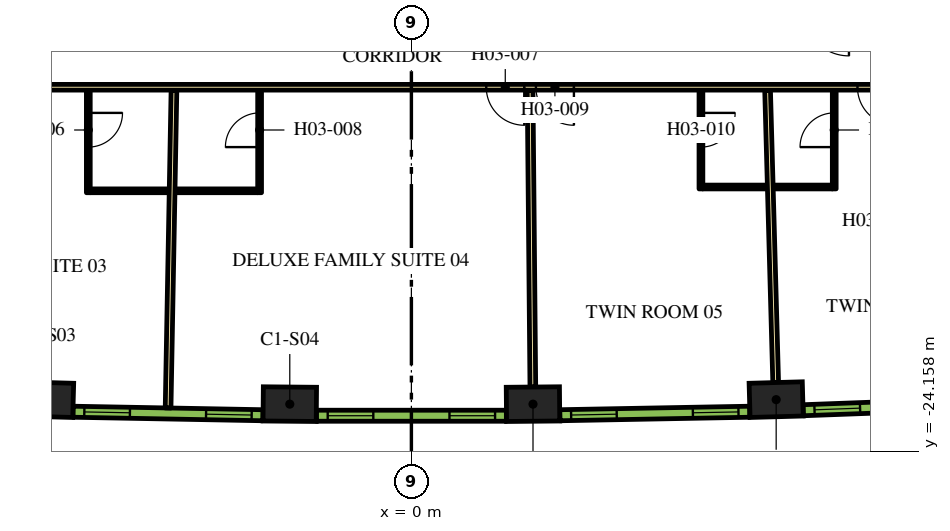
"""IFC4 building model, lengths in metres.
Left out: names, types, materials, properties, quantities, classifications, styles, units other than length and angle.
Written with IfcOpenShell. Run it as: python <this file> out.ifc"""

import sys

from ifc_helpers import new_model, si_unit, direction, frame, frame_2d, origin, origin_2d, place, context, subcontext, project, spatial, rectangle, extrude, element, fill, save


model = new_model("IFC4")
c1 = context("Model", 3, precision=1e-05, world=origin(), true_north=direction((0.0, 1.0)))
c2 = subcontext(c1, "Body", "Model", "MODEL_VIEW")
j1 = project(units=[si_unit("LENGTHUNIT", "METRE"), si_unit("PLANEANGLEUNIT", "RADIAN")], contexts=[c1])
p1 = place(None, origin())
s1 = spatial("IfcSite", under=j1, at=p1, CompositionType="ELEMENT")
p2 = place(p1, origin())
s2 = spatial("IfcBuilding", under=s1, at=p2, CompositionType="ELEMENT")
p3 = place(p2, frame((0.0, 0.0, 51.0)))
s3 = spatial("IfcBuildingStorey", under=s2, at=p3, CompositionType="ELEMENT", Elevation=51.0)
for number, where, z_axis, x_axis in (
    (1, (-9.599, -22.795, 0.0), (0.0, 0.0, 1.0), (1.0, -0.028, 0.0)),
    (2, (-3.2, -22.913, 0.0), (0.0, 0.0, 1.0), (1.0, -0.009, 0.0)),
    (3, (3.2, -22.913, 0.0), (0.0, 0.0, 1.0), (1.0, 0.009, 0.0)),
    (4, (9.599, -22.795, 0.0), (0.0, 0.0, 1.0), (1.0, 0.028, 0.0)),
):
    element("IfcColumn", number, at=place(p3, frame(where, z_axis=z_axis, x_axis=x_axis)), inside=s3, PredefinedType="COLUMN", context=c2, shape_type="SweptSolid", body=[
        extrude(rectangle(XDim=1.4, YDim=0.9, at=origin_2d()), origin(), (0.0, 0.0, 1.0), 3.9),
    ])
p4 = place(p3, frame((12.918, -14.575, 0.0), z_axis=(0.0, 0.0, 1.0), x_axis=(-1.0, 0.0, 0.0)))
e5 = element("IfcWall", 5, at=p4, inside=s3, PredefinedType="PARTITIONING", context=c2, shape_type="SweptSolid", body=[
    extrude(rectangle(XDim=25.766, YDim=0.15, at=frame_2d((12.883, 0.0))), origin(), (0.0, 0.0, 1.0), 2.75),
])
p5 = place(p4, frame((24.586, 0.0, 0.0)))
e6 = element("IfcOpeningElement", 6, at=p5, cuts=e5, PredefinedType="OPENING", context=c2, shape_type="SweptSolid", body=[
    extrude(rectangle(XDim=1.0, YDim=2.1, at=frame_2d((0.5, 1.05))), frame((0.0, 0.085, 0.0), z_axis=(0.0, -1.0, 0.0), x_axis=(1.0, 0.0, 0.0)), (0.0, 0.0, 1.0), 0.17),
])
p6 = place(p4, frame((9.948, 0.0, 0.0)))
e7 = element("IfcOpeningElement", 7, at=p6, cuts=e5, PredefinedType="OPENING", context=c2, shape_type="SweptSolid", body=[
    extrude(rectangle(XDim=1.0, YDim=2.1, at=frame_2d((0.5, 1.05))), frame((0.0, 0.085, 0.0), z_axis=(0.0, -1.0, 0.0), x_axis=(1.0, 0.0, 0.0)), (0.0, 0.0, 1.0), 0.17),
])
p7 = place(p4, frame((8.642, 0.0, 0.0)))
e8 = element("IfcOpeningElement", 8, at=p7, cuts=e5, PredefinedType="OPENING", context=c2, shape_type="SweptSolid", body=[
    extrude(rectangle(XDim=1.0, YDim=2.1, at=frame_2d((0.5, 1.05))), frame((0.0, 0.085, 0.0), z_axis=(0.0, -1.0, 0.0), x_axis=(1.0, 0.0, 0.0)), (0.0, 0.0, 1.0), 0.17),
])
p8 = place(p4, frame((0.18, 0.0, 0.0)))
e9 = element("IfcOpeningElement", 9, at=p8, cuts=e5, PredefinedType="OPENING", context=c2, shape_type="SweptSolid", body=[
    extrude(rectangle(XDim=1.0, YDim=2.1, at=frame_2d((0.5, 1.05))), frame((0.0, 0.085, 0.0), z_axis=(0.0, -1.0, 0.0), x_axis=(1.0, 0.0, 0.0)), (0.0, 0.0, 1.0), 0.17),
])
p9 = place(p3, frame((-6.402, -23.014, 0.0), z_axis=(0.0, 0.0, 1.0), x_axis=(0.01849587109, 0.999828936745, 0.0)))
e10 = element("IfcWall", 10, at=p9, inside=s3, PredefinedType="PARTITIONING", context=c2, shape_type="SweptSolid", body=[
    extrude(rectangle(XDim=8.355, YDim=0.15, at=frame_2d((4.178, 0.0))), origin(), (0.0, 0.0, 1.0), 2.75),
])
p10 = place(p3, frame((3.196, -22.463, 0.0), z_axis=(0.0, 0.0, 1.0), x_axis=(-0.00926060032, 0.999957119721, 0.0)))
e11 = element("IfcWall", 11, at=p10, inside=s3, PredefinedType="PARTITIONING", context=c2, shape_type="SweptSolid", body=[
    extrude(rectangle(XDim=7.803, YDim=0.15, at=frame_2d((3.902, 0.0))), origin(), (0.0, 0.0, 1.0), 2.75),
])
p11 = place(p3, frame((9.586, -22.345, 0.0), z_axis=(0.0, 0.0, 1.0), x_axis=(-0.027722115646, 0.999615668297, 0.0)))
e12 = element("IfcWall", 12, at=p11, inside=s3, PredefinedType="PARTITIONING", context=c2, shape_type="SweptSolid", body=[
    extrude(rectangle(XDim=7.688, YDim=0.15, at=frame_2d((3.844, 0.0))), origin(), (0.0, 0.0, 1.0), 2.75),
])
p12 = place(p3, frame((-8.502, -14.65, 0.0), z_axis=(0.0, 0.0, 1.0), x_axis=(0.0, -1.0, 0.0)))
e13 = element("IfcWall", 13, at=p12, inside=s3, PredefinedType="PARTITIONING", context=c2, shape_type="SweptSolid", body=[
    extrude(rectangle(XDim=2.7, YDim=0.1, at=frame_2d((1.35, 0.0))), origin(), (0.0, 0.0, 1.0), 2.75),
])
p13 = place(p12, frame((0.6, 0.0, 0.0)))
e14 = element("IfcOpeningElement", 14, at=p13, cuts=e13, PredefinedType="OPENING", context=c2, shape_type="SweptSolid", body=[
    extrude(rectangle(XDim=0.9, YDim=2.1, at=frame_2d((0.45, 1.05))), frame((0.0, 0.06, 0.0), z_axis=(0.0, -1.0, 0.0), x_axis=(1.0, 0.0, 0.0)), (0.0, 0.0, 1.0), 0.12),
])
p14 = place(p3, frame((-8.452, -17.3, 0.0), z_axis=(0.0, 0.0, 1.0), x_axis=(1.0, 0.0, 0.0)))
e15 = element("IfcWall", 15, at=p14, inside=s3, PredefinedType="PARTITIONING", context=c2, shape_type="SweptSolid", body=[
    extrude(rectangle(XDim=2.07, YDim=0.1, at=frame_2d((1.035, 0.0))), origin(), (0.0, 0.0, 1.0), 2.75),
])
p15 = place(p3, frame((-3.994, -17.35, 0.0), z_axis=(0.0, 0.0, 1.0), x_axis=(0.0, 1.0, 0.0)))
e16 = element("IfcWall", 16, at=p15, inside=s3, PredefinedType="PARTITIONING", context=c2, shape_type="SweptSolid", body=[
    extrude(rectangle(XDim=2.7, YDim=0.1, at=frame_2d((1.35, 0.0))), origin(), (0.0, 0.0, 1.0), 2.75),
])
p16 = place(p15, frame((1.2, 0.0, 0.0)))
e17 = element("IfcOpeningElement", 17, at=p16, cuts=e16, PredefinedType="OPENING", context=c2, shape_type="SweptSolid", body=[
    extrude(rectangle(XDim=0.9, YDim=2.1, at=frame_2d((0.45, 1.05))), frame((0.0, 0.06, 0.0), z_axis=(0.0, -1.0, 0.0), x_axis=(1.0, 0.0, 0.0)), (0.0, 0.0, 1.0), 0.12),
])
p17 = place(p3, frame((-4.044, -17.3, 0.0), z_axis=(0.0, 0.0, 1.0), x_axis=(-1.0, 0.0, 0.0)))
e18 = element("IfcWall", 18, at=p17, inside=s3, PredefinedType="PARTITIONING", context=c2, shape_type="SweptSolid", body=[
    extrude(rectangle(XDim=2.17, YDim=0.1, at=frame_2d((1.085, 0.0))), origin(), (0.0, 0.0, 1.0), 2.75),
])
p18 = place(p3, frame((7.619, -14.65, 0.0), z_axis=(0.0, 0.0, 1.0), x_axis=(0.0, -1.0, 0.0)))
e19 = element("IfcWall", 19, at=p18, inside=s3, PredefinedType="PARTITIONING", context=c2, shape_type="SweptSolid", body=[
    extrude(rectangle(XDim=2.6, YDim=0.1, at=frame_2d((1.3, 0.0))), origin(), (0.0, 0.0, 1.0), 2.75),
])
p19 = place(p18, frame((0.6, 0.0, 0.0)))
e20 = element("IfcOpeningElement", 20, at=p19, cuts=e19, PredefinedType="OPENING", context=c2, shape_type="SweptSolid", body=[
    extrude(rectangle(XDim=0.9, YDim=2.1, at=frame_2d((0.45, 1.05))), frame((0.0, 0.06, 0.0), z_axis=(0.0, -1.0, 0.0), x_axis=(1.0, 0.0, 0.0)), (0.0, 0.0, 1.0), 0.12),
])
p20 = place(p3, frame((7.669, -17.2, 0.0), z_axis=(0.0, 0.0, 1.0), x_axis=(1.0, 0.0, 0.0)))
e21 = element("IfcWall", 21, at=p20, inside=s3, PredefinedType="PARTITIONING", context=c2, shape_type="SweptSolid", body=[
    extrude(rectangle(XDim=1.69, YDim=0.1, at=frame_2d((0.845, 0.0))), origin(), (0.0, 0.0, 1.0), 2.75),
])
p21 = place(p3, frame((11.127, -17.25, 0.0), z_axis=(0.0, 0.0, 1.0), x_axis=(0.0, 1.0, 0.0)))
e22 = element("IfcWall", 22, at=p21, inside=s3, PredefinedType="PARTITIONING", context=c2, shape_type="SweptSolid", body=[
    extrude(rectangle(XDim=2.6, YDim=0.1, at=frame_2d((1.3, 0.0))), origin(), (0.0, 0.0, 1.0), 2.75),
])
p22 = place(p21, frame((1.1, 0.0, 0.0)))
e23 = element("IfcOpeningElement", 23, at=p22, cuts=e22, PredefinedType="OPENING", context=c2, shape_type="SweptSolid", body=[
    extrude(rectangle(XDim=0.9, YDim=2.1, at=frame_2d((0.45, 1.05))), frame((0.0, 0.06, 0.0), z_axis=(0.0, -1.0, 0.0), x_axis=(1.0, 0.0, 0.0)), (0.0, 0.0, 1.0), 0.12),
])
p23 = place(p3, frame((11.077, -17.2, 0.0), z_axis=(0.0, 0.0, 1.0), x_axis=(-1.0, 0.0, 0.0)))
e24 = element("IfcWall", 24, at=p23, inside=s3, PredefinedType="PARTITIONING", context=c2, shape_type="SweptSolid", body=[
    extrude(rectangle(XDim=1.55, YDim=0.1, at=frame_2d((0.775, 0.0))), origin(), (0.0, 0.0, 1.0), 2.75),
])
p24 = place(p3, frame((-8.904, -23.113, 0.0), z_axis=(0.0, 0.0, 1.0), x_axis=(0.999829529479, -0.018463801951, 0.0)))
e25 = element("IfcWall", 25, at=p24, inside=s3, PredefinedType="SOLIDWALL", context=c2, shape_type="SweptSolid", body=[
    extrude(rectangle(XDim=4.998, YDim=0.29, at=frame_2d((2.499, 0.0))), origin(), (0.0, 0.0, 1.0), 3.65),
])
p25 = place(p24, frame((0.297, 0.0, 0.9)))
e26 = element("IfcOpeningElement", 26, at=p25, cuts=e25, PredefinedType="OPENING", context=c2, shape_type="SweptSolid", body=[
    extrude(rectangle(XDim=1.2, YDim=2.15, at=frame_2d((0.6, 1.075))), frame((0.0, 0.155, 0.0), z_axis=(0.0, -1.0, 0.0), x_axis=(1.0, 0.0, 0.0)), (0.0, 0.0, 1.0), 0.31),
])
p26 = place(p24, frame((3.501, 0.0, 0.9)))
e27 = element("IfcOpeningElement", 27, at=p26, cuts=e25, PredefinedType="OPENING", context=c2, shape_type="SweptSolid", body=[
    extrude(rectangle(XDim=1.2, YDim=2.15, at=frame_2d((0.6, 1.075))), frame((0.0, 0.155, 0.0), z_axis=(0.0, -1.0, 0.0), x_axis=(1.0, 0.0, 0.0)), (0.0, 0.0, 1.0), 0.31),
])
p27 = place(p3, frame((-2.499, -23.218, 0.0), z_axis=(0.0, 0.0, 1.0), x_axis=(1.0, 0.0, 0.0)))
e28 = element("IfcWall", 28, at=p27, inside=s3, PredefinedType="SOLIDWALL", context=c2, shape_type="SweptSolid", body=[
    extrude(rectangle(XDim=4.998, YDim=0.29, at=frame_2d((2.499, 0.0))), origin(), (0.0, 0.0, 1.0), 3.65),
])
p28 = place(p27, frame((0.297, 0.0, 0.9)))
e29 = element("IfcOpeningElement", 29, at=p28, cuts=e28, PredefinedType="OPENING", context=c2, shape_type="SweptSolid", body=[
    extrude(rectangle(XDim=1.2, YDim=2.15, at=frame_2d((0.6, 1.075))), frame((0.0, 0.155, 0.0), z_axis=(0.0, -1.0, 0.0), x_axis=(1.0, 0.0, 0.0)), (0.0, 0.0, 1.0), 0.31),
])
p29 = place(p27, frame((3.501, 0.0, 0.9)))
e30 = element("IfcOpeningElement", 30, at=p29, cuts=e28, PredefinedType="OPENING", context=c2, shape_type="SweptSolid", body=[
    extrude(rectangle(XDim=1.2, YDim=2.15, at=frame_2d((0.6, 1.075))), frame((0.0, 0.155, 0.0), z_axis=(0.0, -1.0, 0.0), x_axis=(1.0, 0.0, 0.0)), (0.0, 0.0, 1.0), 0.31),
])
p30 = place(p3, frame((3.906, -23.205, 0.0), z_axis=(0.0, 0.0, 1.0), x_axis=(0.999829529479, 0.018463801951, 0.0)))
e31 = element("IfcWall", 31, at=p30, inside=s3, PredefinedType="SOLIDWALL", context=c2, shape_type="SweptSolid", body=[
    extrude(rectangle(XDim=4.998, YDim=0.29, at=frame_2d((2.499, 0.0))), origin(), (0.0, 0.0, 1.0), 3.65),
])
p31 = place(p30, frame((0.297, 0.0, 0.9)))
e32 = element("IfcOpeningElement", 32, at=p31, cuts=e31, PredefinedType="OPENING", context=c2, shape_type="SweptSolid", body=[
    extrude(rectangle(XDim=1.2, YDim=2.15, at=frame_2d((0.6, 1.075))), frame((0.0, 0.155, 0.0), z_axis=(0.0, -1.0, 0.0), x_axis=(1.0, 0.0, 0.0)), (0.0, 0.0, 1.0), 0.31),
])
p32 = place(p30, frame((3.501, 0.0, 0.9)))
e33 = element("IfcOpeningElement", 33, at=p32, cuts=e31, PredefinedType="OPENING", context=c2, shape_type="SweptSolid", body=[
    extrude(rectangle(XDim=1.2, YDim=2.15, at=frame_2d((0.6, 1.075))), frame((0.0, 0.155, 0.0), z_axis=(0.0, -1.0, 0.0), x_axis=(1.0, 0.0, 0.0)), (0.0, 0.0, 1.0), 0.31),
])
p33 = place(p3, frame((10.31, -23.074, 0.0), z_axis=(0.0, 0.0, 1.0), x_axis=(0.999317974969, 0.036926750529, 0.0)))
e34 = element("IfcWall", 34, at=p33, inside=s3, PredefinedType="SOLIDWALL", context=c2, shape_type="SweptSolid", body=[
    extrude(rectangle(XDim=4.998, YDim=0.29, at=frame_2d((2.499, 0.0))), origin(), (0.0, 0.0, 1.0), 3.65),
])
p34 = place(p33, frame((0.297, 0.0, 0.9)))
e35 = element("IfcOpeningElement", 35, at=p34, cuts=e34, PredefinedType="OPENING", context=c2, shape_type="SweptSolid", body=[
    extrude(rectangle(XDim=1.2, YDim=2.15, at=frame_2d((0.6, 1.075))), frame((0.0, 0.155, 0.0), z_axis=(0.0, -1.0, 0.0), x_axis=(1.0, 0.0, 0.0)), (0.0, 0.0, 1.0), 0.31),
])
p35 = place(p33, frame((3.501, 0.0, 0.9)))
e36 = element("IfcOpeningElement", 36, at=p35, cuts=e34, PredefinedType="OPENING", context=c2, shape_type="SweptSolid", body=[
    extrude(rectangle(XDim=1.2, YDim=2.15, at=frame_2d((0.6, 1.075))), frame((0.0, 0.155, 0.0), z_axis=(0.0, -1.0, 0.0), x_axis=(1.0, 0.0, 0.0)), (0.0, 0.0, 1.0), 0.31),
])
p36 = place(p13, origin())
e37 = element("IfcDoor", 37, at=p36, inside=s3, OperationType="SINGLE_SWING_RIGHT", PredefinedType="DOOR", context=c2, shape_type="SweptSolid", body=[
    extrude(rectangle(XDim=0.9, YDim=2.1, at=frame_2d((0.45, 1.05))), frame((0.0, 0.025, 0.0), z_axis=(0.0, -1.0, 0.0), x_axis=(1.0, 0.0, 0.0)), (0.0, 0.0, 1.0), 0.05),
])
fill(e14, e37)
p37 = place(p6, origin())
e38 = element("IfcDoor", 38, at=p37, inside=s3, OperationType="SINGLE_SWING_LEFT", PredefinedType="DOOR", context=c2, shape_type="SweptSolid", body=[
    extrude(rectangle(XDim=1.0, YDim=2.1, at=frame_2d((0.5, 1.05))), frame((0.0, 0.025, 0.0), z_axis=(0.0, -1.0, 0.0), x_axis=(1.0, 0.0, 0.0)), (0.0, 0.0, 1.0), 0.05),
])
fill(e7, e38)
p38 = place(p16, origin())
e39 = element("IfcDoor", 39, at=p38, inside=s3, OperationType="SINGLE_SWING_LEFT", PredefinedType="DOOR", context=c2, shape_type="SweptSolid", body=[
    extrude(rectangle(XDim=0.9, YDim=2.1, at=frame_2d((0.45, 1.05))), frame((0.0, 0.025, 0.0), z_axis=(0.0, -1.0, 0.0), x_axis=(1.0, 0.0, 0.0)), (0.0, 0.0, 1.0), 0.05),
])
fill(e17, e39)
p39 = place(p7, origin())
e40 = element("IfcDoor", 40, at=p39, inside=s3, OperationType="SINGLE_SWING_RIGHT", PredefinedType="DOOR", context=c2, shape_type="SweptSolid", body=[
    extrude(rectangle(XDim=1.0, YDim=2.1, at=frame_2d((0.5, 1.05))), frame((0.0, 0.025, 0.0), z_axis=(0.0, -1.0, 0.0), x_axis=(1.0, 0.0, 0.0)), (0.0, 0.0, 1.0), 0.05),
])
fill(e8, e40)
p40 = place(p19, origin())
e41 = element("IfcDoor", 41, at=p40, inside=s3, OperationType="SINGLE_SWING_LEFT", PredefinedType="DOOR", context=c2, shape_type="SweptSolid", body=[
    extrude(rectangle(XDim=0.9, YDim=2.1, at=frame_2d((0.45, 1.05))), frame((0.0, 0.025, 0.0), z_axis=(0.0, -1.0, 0.0), x_axis=(1.0, 0.0, 0.0)), (0.0, 0.0, 1.0), 0.05),
])
fill(e20, e41)
p41 = place(p8, origin())
e42 = element("IfcDoor", 42, at=p41, inside=s3, OperationType="SINGLE_SWING_LEFT", PredefinedType="DOOR", context=c2, shape_type="SweptSolid", body=[
    extrude(rectangle(XDim=1.0, YDim=2.1, at=frame_2d((0.5, 1.05))), frame((0.0, 0.025, 0.0), z_axis=(0.0, -1.0, 0.0), x_axis=(1.0, 0.0, 0.0)), (0.0, 0.0, 1.0), 0.05),
])
fill(e9, e42)
p42 = place(p22, origin())
e43 = element("IfcDoor", 43, at=p42, inside=s3, OperationType="SINGLE_SWING_RIGHT", PredefinedType="DOOR", context=c2, shape_type="SweptSolid", body=[
    extrude(rectangle(XDim=0.9, YDim=2.1, at=frame_2d((0.45, 1.05))), frame((0.0, 0.025, 0.0), z_axis=(0.0, -1.0, 0.0), x_axis=(1.0, 0.0, 0.0)), (0.0, 0.0, 1.0), 0.05),
])
fill(e23, e43)
p43 = place(p25, origin())
e44 = element("IfcWindow", 44, at=p43, inside=s3, PartitioningType="DOUBLE_PANEL_VERTICAL", PredefinedType="WINDOW", context=c2, shape_type="SweptSolid", body=[
    extrude(rectangle(XDim=1.2, YDim=2.15, at=frame_2d((0.6, 1.075))), frame((0.0, 0.015, 0.0), z_axis=(0.0, -1.0, 0.0), x_axis=(1.0, 0.0, 0.0)), (0.0, 0.0, 1.0), 0.06),
])
fill(e26, e44)
p44 = place(p26, origin())
e45 = element("IfcWindow", 45, at=p44, inside=s3, PartitioningType="DOUBLE_PANEL_VERTICAL", PredefinedType="WINDOW", context=c2, shape_type="SweptSolid", body=[
    extrude(rectangle(XDim=1.2, YDim=2.15, at=frame_2d((0.6, 1.075))), frame((0.0, 0.015, 0.0), z_axis=(0.0, -1.0, 0.0), x_axis=(1.0, 0.0, 0.0)), (0.0, 0.0, 1.0), 0.06),
])
fill(e27, e45)
p45 = place(p28, origin())
e46 = element("IfcWindow", 46, at=p45, inside=s3, PartitioningType="DOUBLE_PANEL_VERTICAL", PredefinedType="WINDOW", context=c2, shape_type="SweptSolid", body=[
    extrude(rectangle(XDim=1.2, YDim=2.15, at=frame_2d((0.6, 1.075))), frame((0.0, 0.015, 0.0), z_axis=(0.0, -1.0, 0.0), x_axis=(1.0, 0.0, 0.0)), (0.0, 0.0, 1.0), 0.06),
])
fill(e29, e46)
p46 = place(p29, origin())
e47 = element("IfcWindow", 47, at=p46, inside=s3, PartitioningType="DOUBLE_PANEL_VERTICAL", PredefinedType="WINDOW", context=c2, shape_type="SweptSolid", body=[
    extrude(rectangle(XDim=1.2, YDim=2.15, at=frame_2d((0.6, 1.075))), frame((0.0, 0.015, 0.0), z_axis=(0.0, -1.0, 0.0), x_axis=(1.0, 0.0, 0.0)), (0.0, 0.0, 1.0), 0.06),
])
fill(e30, e47)
p47 = place(p31, origin())
e48 = element("IfcWindow", 48, at=p47, inside=s3, PartitioningType="DOUBLE_PANEL_VERTICAL", PredefinedType="WINDOW", context=c2, shape_type="SweptSolid", body=[
    extrude(rectangle(XDim=1.2, YDim=2.15, at=frame_2d((0.6, 1.075))), frame((0.0, 0.015, 0.0), z_axis=(0.0, -1.0, 0.0), x_axis=(1.0, 0.0, 0.0)), (0.0, 0.0, 1.0), 0.06),
])
fill(e32, e48)
p48 = place(p32, origin())
e49 = element("IfcWindow", 49, at=p48, inside=s3, PartitioningType="DOUBLE_PANEL_VERTICAL", PredefinedType="WINDOW", context=c2, shape_type="SweptSolid", body=[
    extrude(rectangle(XDim=1.2, YDim=2.15, at=frame_2d((0.6, 1.075))), frame((0.0, 0.015, 0.0), z_axis=(0.0, -1.0, 0.0), x_axis=(1.0, 0.0, 0.0)), (0.0, 0.0, 1.0), 0.06),
])
fill(e33, e49)
p49 = place(p34, origin())
e50 = element("IfcWindow", 50, at=p49, inside=s3, PartitioningType="DOUBLE_PANEL_VERTICAL", PredefinedType="WINDOW", context=c2, shape_type="SweptSolid", body=[
    extrude(rectangle(XDim=1.2, YDim=2.15, at=frame_2d((0.6, 1.075))), frame((0.0, 0.015, 0.0), z_axis=(0.0, -1.0, 0.0), x_axis=(1.0, 0.0, 0.0)), (0.0, 0.0, 1.0), 0.06),
])
fill(e35, e50)
save(model, sys.argv[1])
